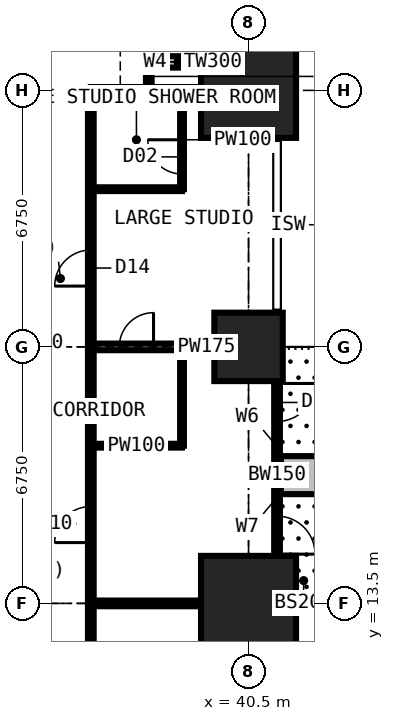
"""IFC4 building model, lengths in metres.
Left out: names, types, materials, properties, quantities, classifications, styles, units other than length and angle.
Written with IfcOpenShell. Run it as: python <this file> out.ifc"""

import sys

from ifc_helpers import new_model, si_unit, direction, frame, frame_2d, origin, origin_2d, place, context, subcontext, project, spatial, rectangle, extrude, element, fill, save


model = new_model("IFC4")
c1 = context("Model", 3, precision=1e-05, world=origin(), true_north=direction((0.0, 1.0)))
c2 = subcontext(c1, "Body", "Model", "MODEL_VIEW")
j1 = project(units=[si_unit("LENGTHUNIT", "METRE"), si_unit("PLANEANGLEUNIT", "RADIAN")], contexts=[c1])
p1 = place(None, origin())
s1 = spatial("IfcSite", under=j1, at=p1, CompositionType="ELEMENT")
p2 = place(p1, origin())
s2 = spatial("IfcBuilding", under=s1, at=p2, CompositionType="ELEMENT")
p3 = place(p2, frame((0.0, 0.0, 80.1)))
s3 = spatial("IfcBuildingStorey", under=s2, at=p3, CompositionType="ELEMENT", Elevation=80.1)
p4 = place(p3, frame((40.5, 13.5, 0.0), z_axis=(0.0, 0.0, 1.0), x_axis=(1.0, 0.0, 0.0)))
e1 = element("IfcColumn", 1, at=p4, inside=s3, PredefinedType="COLUMN", context=c2, shape_type="SweptSolid", body=[
    extrude(rectangle(XDim=2.5, YDim=2.5, at=origin_2d()), origin(), (0.0, 0.0, 1.0), 3.6),
])
p5 = place(p3, frame((40.5, 20.25, 0.0), z_axis=(0.0, 0.0, 1.0), x_axis=(1.0, 0.0, 0.0)))
e2 = element("IfcColumn", 2, at=p5, inside=s3, PredefinedType="COLUMN", context=c2, shape_type="SweptSolid", body=[
    extrude(rectangle(XDim=1.8, YDim=1.8, at=origin_2d()), origin(), (0.0, 0.0, 1.0), 3.6),
])
p6 = place(p3, frame((40.5, 27.0, 0.0), z_axis=(0.0, 0.0, 1.0), x_axis=(1.0, 0.0, 0.0)))
e3 = element("IfcColumn", 3, at=p6, inside=s3, PredefinedType="COLUMN", context=c2, shape_type="SweptSolid", body=[
    extrude(rectangle(XDim=2.5, YDim=2.5, at=origin_2d()), origin(), (0.0, 0.0, 1.0), 3.6),
])
p7 = place(p3, frame((41.25, 20.25, 0.0), z_axis=(0.0, 0.0, 1.0), x_axis=(0.0, -1.0, 0.0)))
e4 = element("IfcWall", 4, at=p7, inside=s3, PredefinedType="SOLIDWALL", context=c2, shape_type="SweptSolid", body=[
    extrude(rectangle(XDim=6.75, YDim=0.15, at=frame_2d((3.375, 0.0))), origin(), (0.0, 0.0, 1.0), 3.375),
])
p8 = place(p7, frame((0.962, 0.0, 0.0)))
e5 = element("IfcOpeningElement", 5, at=p8, cuts=e4, PredefinedType="OPENING", context=c2, shape_type="SweptSolid", body=[
    extrude(rectangle(XDim=1.0, YDim=2.2, at=frame_2d((0.5, 1.1))), frame((0.0, 0.085, 0.0), z_axis=(0.0, -1.0, 0.0), x_axis=(1.0, 0.0, 0.0)), (0.0, 0.0, 1.0), 0.17),
])
p9 = place(p7, frame((2.025, 0.0, 0.9)))
e6 = element("IfcOpeningElement", 6, at=p9, cuts=e4, PredefinedType="OPENING", context=c2, shape_type="SweptSolid", body=[
    extrude(rectangle(XDim=1.2, YDim=1.8, at=frame_2d((0.6, 0.9))), frame((0.0, 0.085, 0.0), z_axis=(0.0, -1.0, 0.0), x_axis=(1.0, 0.0, 0.0)), (0.0, 0.0, 1.0), 0.17),
])
p10 = place(p7, frame((4.454, 0.0, 0.0)))
e7 = element("IfcOpeningElement", 7, at=p10, cuts=e4, PredefinedType="OPENING", context=c2, shape_type="SweptSolid", body=[
    extrude(rectangle(XDim=1.0, YDim=2.2, at=frame_2d((0.5, 1.1))), frame((0.0, 0.085, 0.0), z_axis=(0.0, -1.0, 0.0), x_axis=(1.0, 0.0, 0.0)), (0.0, 0.0, 1.0), 0.17),
])
p11 = place(p7, frame((3.508, 0.0, 0.9)))
e8 = element("IfcOpeningElement", 8, at=p11, cuts=e4, PredefinedType="OPENING", context=c2, shape_type="SweptSolid", body=[
    extrude(rectangle(XDim=0.9, YDim=1.8, at=frame_2d((0.45, 0.9))), frame((0.0, 0.085, 0.0), z_axis=(0.0, -1.0, 0.0), x_axis=(1.0, 0.0, 0.0)), (0.0, 0.0, 1.0), 0.17),
])
p12 = place(p3, frame((41.25, 27.75, 0.0), z_axis=(0.0, 0.0, 1.0), x_axis=(-1.0, 0.0, 0.0)))
e9 = element("IfcWall", 9, at=p12, inside=s3, PredefinedType="SOLIDWALL", context=c2, shape_type="SweptSolid", body=[
    extrude(rectangle(XDim=3.375, YDim=0.3, at=frame_2d((1.688, 0.0))), origin(), (0.0, 0.0, 1.0), 3.375),
])
p13 = place(p12, frame((2.008, 0.0, 0.9)))
e10 = element("IfcOpeningElement", 10, at=p13, cuts=e9, PredefinedType="OPENING", context=c2, shape_type="SweptSolid", body=[
    extrude(rectangle(XDim=1.2, YDim=1.8, at=frame_2d((0.6, 0.9))), frame((0.0, 0.16, 0.0), z_axis=(0.0, -1.0, 0.0), x_axis=(1.0, 0.0, 0.0)), (0.0, 0.0, 1.0), 0.32),
])
p14 = place(p3, frame((37.875, 27.75, 0.0), z_axis=(0.0, 0.0, 1.0), x_axis=(0.0, 1.0, 0.0)))
e11 = element("IfcWall", 11, at=p14, inside=s3, PredefinedType="SOLIDWALL", context=c2, shape_type="SweptSolid", body=[
    extrude(rectangle(XDim=3.375, YDim=0.3, at=frame_2d((1.688, 0.0))), origin(), (0.0, 0.0, 1.0), 3.375),
])
p15 = place(p14, frame((0.788, 0.0, 0.6)))
e12 = element("IfcOpeningElement", 12, at=p15, cuts=e11, PredefinedType="OPENING", context=c2, shape_type="SweptSolid", body=[
    extrude(rectangle(XDim=1.8, YDim=2.1, at=frame_2d((0.9, 1.05))), frame((0.0, 0.16, 0.0), z_axis=(0.0, -1.0, 0.0), x_axis=(1.0, 0.0, 0.0)), (0.0, 0.0, 1.0), 0.32),
])
p16 = place(p3, frame((41.35, 16.875, 0.0), z_axis=(0.0, 0.0, 1.0), x_axis=(1.0, 0.0, 0.0)))
e13 = element("IfcWall", 13, at=p16, inside=s3, PredefinedType="USERDEFINED", context=c2, shape_type="SweptSolid", body=[
    extrude(rectangle(XDim=2.2, YDim=1.0, at=frame_2d((1.1, 0.0))), origin(), (0.0, 0.0, 1.0), 0.9),
])
p17 = place(p3, frame((36.35, 6.75, 0.0), z_axis=(0.0, 0.0, 1.0), x_axis=(0.0, 1.0, 0.0)))
e14 = element("IfcWall", 14, at=p17, inside=s3, PredefinedType="PARTITIONING", context=c2, shape_type="SweptSolid", body=[
    extrude(rectangle(XDim=20.25, YDim=0.15, at=frame_2d((10.125, 0.0))), origin(), (0.0, 0.0, 1.0), 3.375),
])
p18 = place(p17, frame((15.1, 0.0, 0.0)))
e15 = element("IfcOpeningElement", 15, at=p18, cuts=e14, PredefinedType="OPENING", context=c2, shape_type="SweptSolid", body=[
    extrude(rectangle(XDim=0.95, YDim=2.2, at=frame_2d((0.475, 1.1))), frame((0.0, 0.085, 0.0), z_axis=(0.0, -1.0, 0.0), x_axis=(1.0, 0.0, 0.0)), (0.0, 0.0, 1.0), 0.17),
])
p19 = place(p17, frame((8.35, 0.0, 0.0)))
e16 = element("IfcOpeningElement", 16, at=p19, cuts=e14, PredefinedType="OPENING", context=c2, shape_type="SweptSolid", body=[
    extrude(rectangle(XDim=0.95, YDim=2.2, at=frame_2d((0.475, 1.1))), frame((0.0, 0.085, 0.0), z_axis=(0.0, -1.0, 0.0), x_axis=(1.0, 0.0, 0.0)), (0.0, 0.0, 1.0), 0.17),
])
p20 = place(p3, frame((36.35, 13.5, 0.0), z_axis=(0.0, 0.0, 1.0), x_axis=(1.0, 0.0, 0.0)))
e17 = element("IfcWall", 17, at=p20, inside=s3, PredefinedType="PARTITIONING", context=c2, shape_type="SweptSolid", body=[
    extrude(rectangle(XDim=4.884, YDim=0.15, at=frame_2d((2.442, 0.0))), origin(), (0.0, 0.0, 1.0), 2.877),
])
p21 = place(p3, frame((36.35, 17.65, 0.0), z_axis=(0.0, 0.0, 1.0), x_axis=(1.0, 0.0, 0.0)))
e18 = element("IfcWall", 18, at=p21, inside=s3, PredefinedType="PARTITIONING", context=c2, shape_type="SweptSolid", body=[
    extrude(rectangle(XDim=2.4, YDim=0.1, at=frame_2d((1.2, 0.0))), origin(), (0.0, 0.0, 1.0), 3.375),
])
p22 = place(p3, frame((36.35, 20.25, 0.0), z_axis=(0.0, 0.0, 1.0), x_axis=(1.0, 0.0, 0.0)))
e19 = element("IfcWall", 19, at=p22, inside=s3, PredefinedType="PARTITIONING", context=c2, shape_type="SweptSolid", body=[
    extrude(rectangle(XDim=4.884, YDim=0.175, at=frame_2d((2.442, 0.0))), origin(), (0.0, 0.0, 1.0), 2.877),
])
p23 = place(p22, frame((0.75, 0.0, 0.0)))
e20 = element("IfcOpeningElement", 20, at=p23, cuts=e19, PredefinedType="OPENING", context=c2, shape_type="SweptSolid", body=[
    extrude(rectangle(XDim=0.9, YDim=2.2, at=frame_2d((0.45, 1.1))), frame((0.0, 0.097, 0.0), z_axis=(0.0, -1.0, 0.0), x_axis=(1.0, 0.0, 0.0)), (0.0, 0.0, 1.0), 0.195),
])
p24 = place(p3, frame((36.35, 24.4, 0.0), z_axis=(0.0, 0.0, 1.0), x_axis=(1.0, 0.0, 0.0)))
e21 = element("IfcWall", 21, at=p24, inside=s3, PredefinedType="PARTITIONING", context=c2, shape_type="SweptSolid", body=[
    extrude(rectangle(XDim=2.4, YDim=0.1, at=frame_2d((1.2, 0.0))), origin(), (0.0, 0.0, 1.0), 3.375),
])
p25 = place(p3, frame((36.35, 27.0, 0.0), z_axis=(0.0, 0.0, 1.0), x_axis=(1.0, 0.0, 0.0)))
e22 = element("IfcWall", 22, at=p25, inside=s3, PredefinedType="PARTITIONING", context=c2, shape_type="SweptSolid", body=[
    extrude(rectangle(XDim=4.884, YDim=0.175, at=frame_2d((2.442, 0.0))), origin(), (0.0, 0.0, 1.0), 2.877),
])
p26 = place(p3, frame((37.875, 27.0, 0.0), z_axis=(0.0, 0.0, 1.0), x_axis=(0.0, 1.0, 0.0)))
e23 = element("IfcWall", 23, at=p26, inside=s3, PredefinedType="PARTITIONING", context=c2, shape_type="SweptSolid", body=[
    extrude(rectangle(XDim=0.734, YDim=0.15, at=frame_2d((0.367, 0.0))), origin(), (0.0, 0.0, 1.0), 3.375),
])
p27 = place(p3, frame((38.75, 17.65, 0.0), z_axis=(0.0, 0.0, 1.0), x_axis=(0.0, 1.0, 0.0)))
e24 = element("IfcWall", 24, at=p27, inside=s3, PredefinedType="PARTITIONING", context=c2, shape_type="SweptSolid", body=[
    extrude(rectangle(XDim=2.6, YDim=0.1, at=frame_2d((1.3, 0.0))), origin(), (0.0, 0.0, 1.0), 3.375),
])
p28 = place(p3, frame((38.75, 24.4, 0.0), z_axis=(0.0, 0.0, 1.0), x_axis=(0.0, 1.0, 0.0)))
e25 = element("IfcWall", 25, at=p28, inside=s3, PredefinedType="PARTITIONING", context=c2, shape_type="SweptSolid", body=[
    extrude(rectangle(XDim=2.6, YDim=0.1, at=frame_2d((1.3, 0.0))), origin(), (0.0, 0.0, 1.0), 3.375),
])
p29 = place(p28, frame((0.4, 0.0, 0.0)))
e26 = element("IfcOpeningElement", 26, at=p29, cuts=e25, PredefinedType="OPENING", context=c2, shape_type="SweptSolid", body=[
    extrude(rectangle(XDim=0.9, YDim=2.2, at=frame_2d((0.45, 1.1))), frame((0.0, 0.06, 0.0), z_axis=(0.0, -1.0, 0.0), x_axis=(1.0, 0.0, 0.0)), (0.0, 0.0, 1.0), 0.12),
])
p30 = place(p8, origin())
e27 = element("IfcDoor", 27, at=p30, inside=s3, OperationType="SINGLE_SWING_LEFT", PredefinedType="DOOR", context=c2, shape_type="SweptSolid", body=[
    extrude(rectangle(XDim=1.0, YDim=2.2, at=frame_2d((0.5, 1.1))), frame((0.0, 0.025, 0.0), z_axis=(0.0, -1.0, 0.0), x_axis=(1.0, 0.0, 0.0)), (0.0, 0.0, 1.0), 0.05),
])
fill(e5, e27)
p31 = place(p9, origin())
e28 = element("IfcWindow", 28, at=p31, inside=s3, PartitioningType="SINGLE_PANEL", PredefinedType="WINDOW", context=c2, shape_type="SweptSolid", body=[
    extrude(rectangle(XDim=1.2, YDim=1.8, at=frame_2d((0.6, 0.9))), frame((0.0, 0.03, 0.0), z_axis=(0.0, -1.0, 0.0), x_axis=(1.0, 0.0, 0.0)), (0.0, 0.0, 1.0), 0.06),
])
fill(e6, e28)
p32 = place(p10, origin())
e29 = element("IfcDoor", 29, at=p32, inside=s3, OperationType="SINGLE_SWING_RIGHT", PredefinedType="DOOR", context=c2, shape_type="SweptSolid", body=[
    extrude(rectangle(XDim=1.0, YDim=2.2, at=frame_2d((0.5, 1.1))), frame((0.0, 0.025, 0.0), z_axis=(0.0, -1.0, 0.0), x_axis=(1.0, 0.0, 0.0)), (0.0, 0.0, 1.0), 0.05),
])
fill(e7, e29)
p33 = place(p11, origin())
e30 = element("IfcWindow", 30, at=p33, inside=s3, PartitioningType="SINGLE_PANEL", PredefinedType="WINDOW", context=c2, shape_type="SweptSolid", body=[
    extrude(rectangle(XDim=0.9, YDim=1.8, at=frame_2d((0.45, 0.9))), frame((0.0, 0.03, 0.0), z_axis=(0.0, -1.0, 0.0), x_axis=(1.0, 0.0, 0.0)), (0.0, 0.0, 1.0), 0.06),
])
fill(e8, e30)
p34 = place(p13, origin())
e31 = element("IfcWindow", 31, at=p34, inside=s3, PartitioningType="SINGLE_PANEL", PredefinedType="WINDOW", context=c2, shape_type="SweptSolid", body=[
    extrude(rectangle(XDim=1.2, YDim=1.8, at=frame_2d((0.6, 0.9))), frame((0.0, 0.03, 0.0), z_axis=(0.0, -1.0, 0.0), x_axis=(1.0, 0.0, 0.0)), (0.0, 0.0, 1.0), 0.06),
])
fill(e10, e31)
p35 = place(p18, origin())
e32 = element("IfcDoor", 32, at=p35, inside=s3, OperationType="SINGLE_SWING_LEFT", PredefinedType="DOOR", context=c2, shape_type="SweptSolid", body=[
    extrude(rectangle(XDim=0.95, YDim=2.2, at=frame_2d((0.475, 1.1))), frame((0.0, 0.025, 0.0), z_axis=(0.0, -1.0, 0.0), x_axis=(1.0, 0.0, 0.0)), (0.0, 0.0, 1.0), 0.05),
])
fill(e15, e32)
p36 = place(p29, origin())
e33 = element("IfcDoor", 33, at=p36, inside=s3, OperationType="SINGLE_SWING_RIGHT", PredefinedType="DOOR", context=c2, shape_type="SweptSolid", body=[
    extrude(rectangle(XDim=0.9, YDim=2.2, at=frame_2d((0.45, 1.1))), frame((0.0, 0.025, 0.0), z_axis=(0.0, -1.0, 0.0), x_axis=(1.0, 0.0, 0.0)), (0.0, 0.0, 1.0), 0.05),
])
fill(e26, e33)
p37 = place(p19, origin())
e34 = element("IfcDoor", 34, at=p37, inside=s3, OperationType="SINGLE_SWING_LEFT", PredefinedType="DOOR", context=c2, shape_type="SweptSolid", body=[
    extrude(rectangle(XDim=0.95, YDim=2.2, at=frame_2d((0.475, 1.1))), frame((0.0, 0.025, 0.0), z_axis=(0.0, -1.0, 0.0), x_axis=(1.0, 0.0, 0.0)), (0.0, 0.0, 1.0), 0.05),
])
fill(e16, e34)
p38 = place(p23, origin())
e35 = element("IfcDoor", 35, at=p38, inside=s3, OperationType="SINGLE_SWING_RIGHT", PredefinedType="DOOR", context=c2, shape_type="SweptSolid", body=[
    extrude(rectangle(XDim=0.9, YDim=2.2, at=frame_2d((0.45, 1.1))), frame((0.0, 0.025, 0.0), z_axis=(0.0, -1.0, 0.0), x_axis=(1.0, 0.0, 0.0)), (0.0, 0.0, 1.0), 0.05),
])
fill(e20, e35)
save(model, sys.argv[1])
